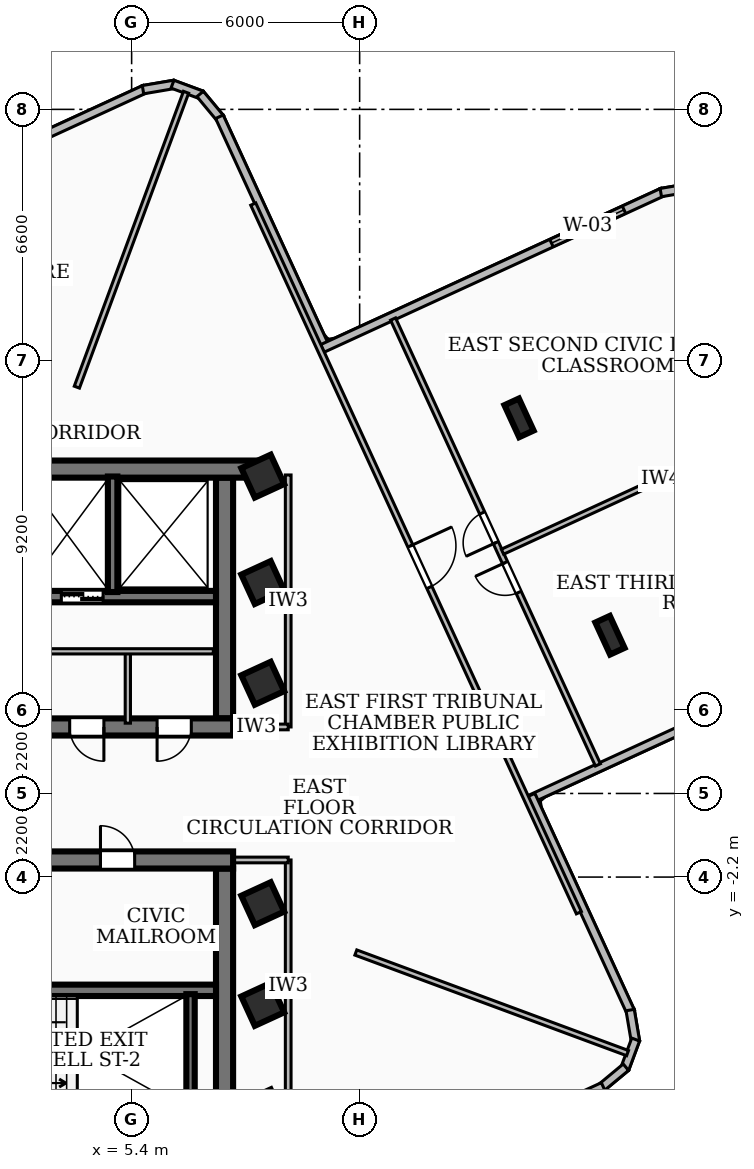
"""IFC4 building model, lengths in metres.
Left out: names, types, materials, properties, quantities, classifications, styles, units other than length and angle.
Written with IfcOpenShell. Run it as: python <this file> out.ifc"""

import sys

from ifc_helpers import new_model, si_unit, direction, frame, frame_2d, origin, origin_2d, place, context, subcontext, project, spatial, rectangle, i_section, extrude, element, fill, save


model = new_model("IFC4")
c1 = context("Model", 3, precision=1e-05, world=origin(), true_north=direction((0.0, 1.0)))
c2 = subcontext(c1, "Body", "Model", "MODEL_VIEW")
j1 = project(units=[si_unit("LENGTHUNIT", "METRE"), si_unit("PLANEANGLEUNIT", "RADIAN")], contexts=[c1])
p1 = place(None, origin())
s1 = spatial("IfcSite", under=j1, at=p1, CompositionType="ELEMENT")
p2 = place(p1, origin())
s2 = spatial("IfcBuilding", under=s1, at=p2, CompositionType="ELEMENT")
p3 = place(p2, frame((0.0, 0.0, 184.68)))
s3 = spatial("IfcBuildingStorey", under=s2, at=p3, CompositionType="ELEMENT", Elevation=184.68)
p4 = place(p3, frame((-8.78, 8.535, 0.0), z_axis=(0.0, 0.0, 1.0), x_axis=(1.0, 0.0, 0.0)))
e1 = element("IfcWall", 1, at=p4, inside=s3, PredefinedType="SHEAR", context=c2, shape_type="SweptSolid", body=[
    extrude(rectangle(XDim=17.56, YDim=0.45, at=frame_2d((8.78, 0.0))), origin(), (0.0, 0.0, 1.0), 3.34),
])
p5 = place(p3, frame((8.07, 1.75, 0.0), z_axis=(0.0, 0.0, 1.0), x_axis=(-1.0, 0.0, 0.0)))
e2 = element("IfcWall", 2, at=p5, inside=s3, PredefinedType="SHEAR", context=c2, shape_type="SweptSolid", body=[
    extrude(rectangle(XDim=16.14, YDim=0.45, at=frame_2d((8.07, 0.0))), origin(), (0.0, 0.0, 1.0), 3.34),
])
p6 = place(p5, frame((7.45, 0.0, 0.0)))
e3 = element("IfcOpeningElement", 3, at=p6, cuts=e2, PredefinedType="OPENING", context=c2, shape_type="SweptSolid", body=[
    extrude(rectangle(XDim=1.0, YDim=2.1, at=frame_2d((0.5, 1.05))), frame((0.0, 0.235, 0.0), z_axis=(0.0, -1.0, 0.0), x_axis=(1.0, 0.0, 0.0)), (0.0, 0.0, 1.0), 0.47),
])
p7 = place(p5, frame((3.4, 0.0, 0.0)))
e4 = element("IfcOpeningElement", 4, at=p7, cuts=e2, PredefinedType="OPENING", context=c2, shape_type="SweptSolid", body=[
    extrude(rectangle(XDim=0.9, YDim=2.06, at=frame_2d((0.45, 1.03))), frame((0.0, 0.235, 0.0), z_axis=(0.0, -1.0, 0.0), x_axis=(1.0, 0.0, 0.0)), (0.0, 0.0, 1.0), 0.47),
])
p8 = place(p5, frame((1.1, 0.0, 0.0)))
e5 = element("IfcOpeningElement", 5, at=p8, cuts=e2, PredefinedType="OPENING", context=c2, shape_type="SweptSolid", body=[
    extrude(rectangle(XDim=0.9, YDim=2.06, at=frame_2d((0.45, 1.03))), frame((0.0, 0.235, 0.0), z_axis=(0.0, -1.0, 0.0), x_axis=(1.0, 0.0, 0.0)), (0.0, 0.0, 1.0), 0.47),
])
p9 = place(p3, frame((7.845, 8.31, 0.0), z_axis=(0.0, 0.0, 1.0), x_axis=(0.0, -1.0, 0.0)))
e6 = element("IfcWall", 6, at=p9, inside=s3, PredefinedType="SHEAR", context=c2, shape_type="SweptSolid", body=[
    extrude(rectangle(XDim=6.335, YDim=0.45, at=frame_2d((3.167, 0.0))), origin(), (0.0, 0.0, 1.0), 3.34),
])
p10 = place(p3, frame((7.62, 5.18, 0.0), z_axis=(0.0, 0.0, 1.0), x_axis=(-1.0, 0.0, 0.0)))
e7 = element("IfcWall", 7, at=p10, inside=s3, PredefinedType="SOLIDWALL", context=c2, shape_type="SweptSolid", body=[
    extrude(rectangle(XDim=15.24, YDim=0.3, at=frame_2d((7.62, 0.0))), origin(), (0.0, 0.0, 1.0), 3.34),
])
p11 = place(p10, frame((5.77, 0.0, 0.0)))
e8 = element("IfcOpeningElement", 8, at=p11, cuts=e7, PredefinedType="OPENING", context=c2, shape_type="SweptSolid", body=[
    extrude(rectangle(XDim=1.1, YDim=2.15, at=frame_2d((0.55, 1.075))), frame((0.0, 0.16, 0.0), z_axis=(0.0, -1.0, 0.0), x_axis=(1.0, 0.0, 0.0)), (0.0, 0.0, 1.0), 0.32),
])
p12 = place(p10, frame((2.97, 0.0, 0.0)))
e9 = element("IfcOpeningElement", 9, at=p12, cuts=e7, PredefinedType="OPENING", context=c2, shape_type="SweptSolid", body=[
    extrude(rectangle(XDim=1.1, YDim=2.15, at=frame_2d((0.55, 1.075))), frame((0.0, 0.16, 0.0), z_axis=(0.0, -1.0, 0.0), x_axis=(1.0, 0.0, 0.0)), (0.0, 0.0, 1.0), 0.32),
])
p13 = place(p10, frame((7.97, 0.0, 0.0)))
e10 = element("IfcOpeningElement", 10, at=p13, cuts=e7, PredefinedType="OPENING", context=c2, shape_type="SweptSolid", body=[
    extrude(rectangle(XDim=1.0, YDim=2.1, at=frame_2d((0.5, 1.05))), frame((0.0, 0.16, 0.0), z_axis=(0.0, -1.0, 0.0), x_axis=(1.0, 0.0, 0.0)), (0.0, 0.0, 1.0), 0.32),
])
p14 = place(p3, frame((-8.07, -1.75, 0.0), z_axis=(0.0, 0.0, 1.0), x_axis=(1.0, 0.0, 0.0)))
e11 = element("IfcWall", 11, at=p14, inside=s3, PredefinedType="SHEAR", context=c2, shape_type="SweptSolid", body=[
    extrude(rectangle(XDim=16.14, YDim=0.45, at=frame_2d((8.07, 0.0))), origin(), (0.0, 0.0, 1.0), 3.34),
])
p15 = place(p14, frame((7.45, 0.0, 0.0)))
e12 = element("IfcOpeningElement", 12, at=p15, cuts=e11, PredefinedType="OPENING", context=c2, shape_type="SweptSolid", body=[
    extrude(rectangle(XDim=1.0, YDim=2.1, at=frame_2d((0.5, 1.05))), frame((0.0, 0.235, 0.0), z_axis=(0.0, -1.0, 0.0), x_axis=(1.0, 0.0, 0.0)), (0.0, 0.0, 1.0), 0.47),
])
p16 = place(p14, frame((12.65, 0.0, 0.0)))
e13 = element("IfcOpeningElement", 13, at=p16, cuts=e11, PredefinedType="OPENING", context=c2, shape_type="SweptSolid", body=[
    extrude(rectangle(XDim=0.9, YDim=2.06, at=frame_2d((0.45, 1.03))), frame((0.0, 0.235, 0.0), z_axis=(0.0, -1.0, 0.0), x_axis=(1.0, 0.0, 0.0)), (0.0, 0.0, 1.0), 0.47),
])
p17 = place(p14, frame((0.565, 0.0, 0.0)))
e14 = element("IfcOpeningElement", 14, at=p17, cuts=e11, PredefinedType="OPENING", context=c2, shape_type="SweptSolid", body=[
    extrude(rectangle(XDim=1.05, YDim=2.15, at=frame_2d((0.525, 1.075))), frame((0.0, 0.235, 0.0), z_axis=(0.0, -1.0, 0.0), x_axis=(1.0, 0.0, 0.0)), (0.0, 0.0, 1.0), 0.47),
])
p18 = place(p14, frame((2.125, 0.0, 0.0)))
e15 = element("IfcOpeningElement", 15, at=p18, cuts=e11, PredefinedType="OPENING", context=c2, shape_type="SweptSolid", body=[
    extrude(rectangle(XDim=1.05, YDim=2.15, at=frame_2d((0.525, 1.075))), frame((0.0, 0.235, 0.0), z_axis=(0.0, -1.0, 0.0), x_axis=(1.0, 0.0, 0.0)), (0.0, 0.0, 1.0), 0.47),
])
p19 = place(p14, frame((3.685, 0.0, 0.0)))
e16 = element("IfcOpeningElement", 16, at=p19, cuts=e11, PredefinedType="OPENING", context=c2, shape_type="SweptSolid", body=[
    extrude(rectangle(XDim=1.05, YDim=2.15, at=frame_2d((0.525, 1.075))), frame((0.0, 0.235, 0.0), z_axis=(0.0, -1.0, 0.0), x_axis=(1.0, 0.0, 0.0)), (0.0, 0.0, 1.0), 0.47),
])
p20 = place(p3, frame((7.845, -1.975, 0.0), z_axis=(0.0, 0.0, 1.0), x_axis=(0.0, -1.0, 0.0)))
e17 = element("IfcWall", 17, at=p20, inside=s3, PredefinedType="SHEAR", context=c2, shape_type="SweptSolid", body=[
    extrude(rectangle(XDim=6.335, YDim=0.45, at=frame_2d((3.167, 0.0))), origin(), (0.0, 0.0, 1.0), 3.34),
])
p21 = place(p3, frame((-7.62, -5.18, 0.0), z_axis=(0.0, 0.0, 1.0), x_axis=(1.0, 0.0, 0.0)))
e18 = element("IfcWall", 18, at=p21, inside=s3, PredefinedType="SOLIDWALL", context=c2, shape_type="SweptSolid", body=[
    extrude(rectangle(XDim=15.24, YDim=0.3, at=frame_2d((7.62, 0.0))), origin(), (0.0, 0.0, 1.0), 3.34),
])
p22 = place(p21, frame((5.77, 0.0, 0.0)))
e19 = element("IfcOpeningElement", 19, at=p22, cuts=e18, PredefinedType="OPENING", context=c2, shape_type="SweptSolid", body=[
    extrude(rectangle(XDim=1.1, YDim=2.15, at=frame_2d((0.55, 1.075))), frame((0.0, 0.16, 0.0), z_axis=(0.0, -1.0, 0.0), x_axis=(1.0, 0.0, 0.0)), (0.0, 0.0, 1.0), 0.32),
])
p23 = place(p21, frame((7.97, 0.0, 0.0)))
e20 = element("IfcOpeningElement", 20, at=p23, cuts=e18, PredefinedType="OPENING", context=c2, shape_type="SweptSolid", body=[
    extrude(rectangle(XDim=1.0, YDim=2.1, at=frame_2d((0.5, 1.05))), frame((0.0, 0.16, 0.0), z_axis=(0.0, -1.0, 0.0), x_axis=(1.0, 0.0, 0.0)), (0.0, 0.0, 1.0), 0.32),
])
p24 = place(p3, frame((6.95, -8.34, 0.0), z_axis=(0.0, 0.0, 1.0), x_axis=(0.0, 1.0, 0.0)))
e21 = element("IfcWall", 21, at=p24, inside=s3, PredefinedType="SOLIDWALL", context=c2, shape_type="SweptSolid", body=[
    extrude(rectangle(XDim=3.06, YDim=0.22, at=frame_2d((1.53, 0.0))), origin(), (0.0, 0.0, 1.0), 3.34),
])
p25 = place(p3, frame((4.9, 5.3, 0.0), z_axis=(0.0, 0.0, 1.0), x_axis=(0.0, 1.0, 0.0)))
e22 = element("IfcWall", 22, at=p25, inside=s3, PredefinedType="SOLIDWALL", context=c2, shape_type="SweptSolid", body=[
    extrude(rectangle(XDim=3.04, YDim=0.25, at=frame_2d((1.52, 0.0))), origin(), (0.0, 0.0, 1.0), 3.34),
])
for number, where, z_axis, x_axis in (
    (23, (8.85, -5.55, 0.0), (0.0, 0.0, 1.0), (0.909, 0.418, 0.0)),
    (24, (8.85, -2.9, 0.0), (0.0, 0.0, 1.0), (0.909, 0.418, 0.0)),
    (25, (8.85, 2.9, 0.0), (0.0, 0.0, 1.0), (0.909, 0.418, 0.0)),
    (26, (8.85, 5.55, 0.0), (0.0, 0.0, 1.0), (0.909, 0.418, 0.0)),
    (27, (8.85, 8.35, 0.0), (0.0, 0.0, 1.0), (0.909, 0.418, 0.0)),
):
    element("IfcColumn", number, at=place(p3, frame(where, z_axis=z_axis, x_axis=x_axis)), inside=s3, PredefinedType="COLUMN", context=c2, shape_type="SweptSolid", body=[
        extrude(rectangle(XDim=0.85, YDim=0.85, at=origin_2d()), origin(), (0.0, 0.0, 1.0), 3.6),
    ])
for number, where, z_axis, x_axis in (
    (28, (17.987, 4.164, 0.0), (0.0, 0.0, 1.0), (0.909, 0.418, 0.0)),
    (29, (15.594, 9.883, 0.0), (0.0, 0.0, 1.0), (0.909, 0.418, 0.0)),
):
    element("IfcColumn", number, at=place(p3, frame(where, z_axis=z_axis, x_axis=x_axis)), inside=s3, PredefinedType="COLUMN", context=c2, shape_type="SweptSolid", body=[
        extrude(i_section(OverallWidth=0.418, OverallDepth=0.927, WebThickness=0.019, FlangeThickness=0.032, at=origin_2d()), origin(), (0.0, 0.0, 1.0), 3.6),
    ])
p26 = place(p3, frame((0.042, 15.911, 0.0), z_axis=(0.0, 0.0, 1.0), x_axis=(0.908686412759, 0.417479344719, 0.0)))
e30 = element("IfcWall", 30, at=p26, inside=s3, PredefinedType="SOLIDWALL", context=c2, shape_type="SweptSolid", body=[
    extrude(rectangle(XDim=6.278, YDim=0.22, at=frame_2d((3.139, 0.0))), origin(), (0.0, 0.0, 1.0), 3.34),
])
p27 = place(p3, frame((5.699, 18.518, 0.0), z_axis=(0.0, 0.0, 1.0), x_axis=(0.985892022342, 0.167382556682, 0.0)))
e31 = element("IfcWall", 31, at=p27, inside=s3, PredefinedType="SOLIDWALL", context=c2, shape_type="SweptSolid", body=[
    extrude(rectangle(XDim=0.836, YDim=0.22, at=frame_2d((0.418, 0.0))), origin(), (0.0, 0.0, 1.0), 3.34),
])
p28 = place(p3, frame((6.475, 18.663, 0.0), z_axis=(0.0, 0.0, 1.0), x_axis=(0.937294412261, -0.348538641681, 0.0)))
e32 = element("IfcWall", 32, at=p28, inside=s3, PredefinedType="SOLIDWALL", context=c2, shape_type="SweptSolid", body=[
    extrude(rectangle(XDim=0.818, YDim=0.22, at=frame_2d((0.409, 0.0))), origin(), (0.0, 0.0, 1.0), 3.34),
])
p29 = place(p3, frame((7.203, 18.406, 0.0), z_axis=(0.0, 0.0, 1.0), x_axis=(0.638859924235, -0.769323077261, 0.0)))
e33 = element("IfcWall", 33, at=p29, inside=s3, PredefinedType="SOLIDWALL", context=c2, shape_type="SweptSolid", body=[
    extrude(rectangle(XDim=0.835, YDim=0.22, at=frame_2d((0.417, 0.0))), origin(), (0.0, 0.0, 1.0), 3.34),
])
p30 = place(p3, frame((7.71, 17.806, 0.0), z_axis=(0.0, 0.0, 1.0), x_axis=(0.417566275734, -0.908646468859, 0.0)))
e34 = element("IfcWall", 34, at=p30, inside=s3, PredefinedType="SOLIDWALL", context=c2, shape_type="SweptSolid", body=[
    extrude(rectangle(XDim=6.758, YDim=0.22, at=frame_2d((3.379, 0.0))), origin(), (0.0, 0.0, 1.0), 3.34),
])
p31 = place(p3, frame((10.415, 11.708, 0.0), z_axis=(0.0, 0.0, 1.0), x_axis=(0.908672019386, 0.41751067194, 0.0)))
e35 = element("IfcWall", 35, at=p31, inside=s3, PredefinedType="SOLIDWALL", context=c2, shape_type="SweptSolid", body=[
    extrude(rectangle(XDim=9.858, YDim=0.22, at=frame_2d((4.929, 0.0))), origin(), (0.0, 0.0, 1.0), 3.34),
])
p32 = place(p31, frame((6.64, 0.0, 0.85)))
e36 = element("IfcOpeningElement", 36, at=p32, cuts=e35, PredefinedType="OPENING", context=c2, shape_type="SweptSolid", body=[
    extrude(rectangle(XDim=2.1, YDim=2.0, at=frame_2d((1.05, 1.0))), frame((0.0, 0.12, 0.0), z_axis=(0.0, -1.0, 0.0), x_axis=(1.0, 0.0, 0.0)), (0.0, 0.0, 1.0), 0.24),
])
p33 = place(p3, frame((19.325, 15.81, 0.0), z_axis=(0.0, 0.0, 1.0), x_axis=(0.985859228908, 0.167575597201, 0.0)))
e37 = element("IfcWall", 37, at=p33, inside=s3, PredefinedType="SOLIDWALL", context=c2, shape_type="SweptSolid", body=[
    extrude(rectangle(XDim=0.835, YDim=0.22, at=frame_2d((0.417, 0.0))), origin(), (0.0, 0.0, 1.0), 3.34),
])
p34 = place(p3, frame((24.826, 3.957, 0.0), z_axis=(0.0, 0.0, 1.0), x_axis=(-0.908672019386, -0.41751067194, 0.0)))
e38 = element("IfcWall", 38, at=p34, inside=s3, PredefinedType="SOLIDWALL", context=c2, shape_type="SweptSolid", body=[
    extrude(rectangle(XDim=9.858, YDim=0.22, at=frame_2d((4.929, 0.0))), origin(), (0.0, 0.0, 1.0), 3.34),
])
p35 = place(p34, frame((0.85, 0.0, 0.85)))
e39 = element("IfcOpeningElement", 39, at=p35, cuts=e38, PredefinedType="OPENING", context=c2, shape_type="SweptSolid", body=[
    extrude(rectangle(XDim=2.1, YDim=1.6, at=frame_2d((1.05, 0.8))), frame((0.0, 0.12, 0.0), z_axis=(0.0, -1.0, 0.0), x_axis=(1.0, 0.0, 0.0)), (0.0, 0.0, 1.0), 0.24),
])
p36 = place(p3, frame((15.911, -0.042, 0.0), z_axis=(0.0, 0.0, 1.0), x_axis=(0.417479344719, -0.908686412759, 0.0)))
e40 = element("IfcWall", 40, at=p36, inside=s3, PredefinedType="SOLIDWALL", context=c2, shape_type="SweptSolid", body=[
    extrude(rectangle(XDim=6.278, YDim=0.22, at=frame_2d((3.139, 0.0))), origin(), (0.0, 0.0, 1.0), 3.34),
])
p37 = place(p3, frame((18.518, -5.699, 0.0), z_axis=(0.0, 0.0, 1.0), x_axis=(0.167382556682, -0.985892022342, 0.0)))
e41 = element("IfcWall", 41, at=p37, inside=s3, PredefinedType="SOLIDWALL", context=c2, shape_type="SweptSolid", body=[
    extrude(rectangle(XDim=0.836, YDim=0.22, at=frame_2d((0.418, 0.0))), origin(), (0.0, 0.0, 1.0), 3.34),
])
p38 = place(p3, frame((18.663, -6.475, 0.0), z_axis=(0.0, 0.0, 1.0), x_axis=(-0.348538641681, -0.937294412261, 0.0)))
e42 = element("IfcWall", 42, at=p38, inside=s3, PredefinedType="SOLIDWALL", context=c2, shape_type="SweptSolid", body=[
    extrude(rectangle(XDim=0.818, YDim=0.22, at=frame_2d((0.409, 0.0))), origin(), (0.0, 0.0, 1.0), 3.34),
])
p39 = place(p3, frame((18.406, -7.203, 0.0), z_axis=(0.0, 0.0, 1.0), x_axis=(-0.769323077261, -0.638859924235, 0.0)))
e43 = element("IfcWall", 43, at=p39, inside=s3, PredefinedType="SOLIDWALL", context=c2, shape_type="SweptSolid", body=[
    extrude(rectangle(XDim=0.835, YDim=0.22, at=frame_2d((0.417, 0.0))), origin(), (0.0, 0.0, 1.0), 3.34),
])
p40 = place(p3, frame((17.806, -7.71, 0.0), z_axis=(0.0, 0.0, 1.0), x_axis=(-0.908646468859, -0.417566275734, 0.0)))
e44 = element("IfcWall", 44, at=p40, inside=s3, PredefinedType="SOLIDWALL", context=c2, shape_type="SweptSolid", body=[
    extrude(rectangle(XDim=6.758, YDim=0.22, at=frame_2d((3.379, 0.0))), origin(), (0.0, 0.0, 1.0), 3.34),
])
p41 = place(p3, frame((2.9, 3.74, 0.0), z_axis=(0.0, 0.0, 1.0), x_axis=(1.0, 0.0, 0.0)))
e45 = element("IfcWall", 45, at=p41, inside=s3, PredefinedType="PARTITIONING", context=c2, shape_type="SweptSolid", body=[
    extrude(rectangle(XDim=4.65, YDim=0.138, at=frame_2d((2.325, 0.0))), origin(), (0.0, 0.0, 1.0), 3.34),
])
p42 = place(p3, frame((5.3, 1.85, 0.0), z_axis=(0.0, 0.0, 1.0), x_axis=(0.0, 1.0, 0.0)))
e46 = element("IfcWall", 46, at=p42, inside=s3, PredefinedType="PARTITIONING", context=c2, shape_type="SweptSolid", body=[
    extrude(rectangle(XDim=1.89, YDim=0.138, at=frame_2d((0.945, 0.0))), origin(), (0.0, 0.0, 1.0), 2.57),
])
p43 = place(p3, frame((9.52, 1.75, 0.0), z_axis=(0.0, 0.0, 1.0), x_axis=(0.0, 1.0, 0.0)))
e47 = element("IfcWall", 47, at=p43, inside=s3, PredefinedType="PARTITIONING", context=c2, shape_type="SweptSolid", body=[
    extrude(rectangle(XDim=6.63, YDim=0.15, at=frame_2d((3.315, 0.0))), origin(), (0.0, 0.0, 1.0), 2.644),
])
p44 = place(p3, frame((7.85, 1.75, 0.0), z_axis=(0.0, 0.0, 1.0), x_axis=(1.0, 0.0, 0.0)))
e48 = element("IfcWall", 48, at=p44, inside=s3, PredefinedType="PARTITIONING", context=c2, shape_type="SweptSolid", body=[
    extrude(rectangle(XDim=1.67, YDim=0.15, at=frame_2d((0.835, 0.0))), origin(), (0.0, 0.0, 1.0), 2.57),
])
p45 = place(p3, frame((9.52, -8.38, 0.0), z_axis=(0.0, 0.0, 1.0), x_axis=(0.0, 1.0, 0.0)))
e49 = element("IfcWall", 49, at=p45, inside=s3, PredefinedType="PARTITIONING", context=c2, shape_type="SweptSolid", body=[
    extrude(rectangle(XDim=6.63, YDim=0.15, at=frame_2d((3.315, 0.0))), origin(), (0.0, 0.0, 1.0), 3.34),
])
p46 = place(p3, frame((7.85, -1.75, 0.0), z_axis=(0.0, 0.0, 1.0), x_axis=(1.0, 0.0, 0.0)))
e50 = element("IfcWall", 50, at=p46, inside=s3, PredefinedType="PARTITIONING", context=c2, shape_type="SweptSolid", body=[
    extrude(rectangle(XDim=1.67, YDim=0.15, at=frame_2d((0.835, 0.0))), origin(), (0.0, 0.0, 1.0), 2.57),
])
p47 = place(p3, frame((3.959, 10.691, 0.0), z_axis=(0.0, 0.0, 1.0), x_axis=(0.347243238044, 0.937775097576, 0.0)))
e51 = element("IfcWall", 51, at=p47, inside=s3, PredefinedType="PARTITIONING", context=c2, shape_type="SweptSolid", body=[
    extrude(rectangle(XDim=8.274, YDim=0.145, at=frame_2d((4.137, 0.0))), origin(), (0.0, 0.0, 1.0), 3.34),
])
p48 = place(p3, frame((11.3, -4.185, 0.0), z_axis=(0.0, 0.0, 1.0), x_axis=(0.937797421925, -0.347182942311, 0.0)))
e52 = element("IfcWall", 52, at=p48, inside=s3, PredefinedType="PARTITIONING", context=c2, shape_type="SweptSolid", body=[
    extrude(rectangle(XDim=7.624, YDim=0.145, at=frame_2d((3.812, 0.0))), origin(), (0.0, 0.0, 1.0), 3.34),
])
p49 = place(p3, frame((8.6, 15.508, 0.0), z_axis=(0.0, 0.0, 1.0), x_axis=(0.41757132443, -0.908644148726, 0.0)))
e53 = element("IfcWall", 53, at=p49, inside=s3, PredefinedType="PARTITIONING", context=c2, shape_type="SweptSolid", body=[
    extrude(rectangle(XDim=20.521, YDim=0.145, at=frame_2d((10.26, 0.0))), origin(), (0.0, 0.0, 1.0), 2.644),
])
p50 = place(p49, frame((9.9, 0.0, 0.0)))
e54 = element("IfcOpeningElement", 54, at=p50, cuts=e53, PredefinedType="OPENING", context=c2, shape_type="SweptSolid", body=[
    extrude(rectangle(XDim=1.2, YDim=2.1, at=frame_2d((0.6, 1.05))), frame((0.0, 0.083, 0.0), z_axis=(0.0, -1.0, 0.0), x_axis=(1.0, 0.0, 0.0)), (0.0, 0.0, 1.0), 0.165),
])
p51 = place(p3, frame((15.159, 6.361, 0.0), z_axis=(0.0, 0.0, 1.0), x_axis=(0.908662943876, 0.417530423355, 0.0)))
e55 = element("IfcWall", 55, at=p51, inside=s3, PredefinedType="PARTITIONING", context=c2, shape_type="SweptSolid", body=[
    extrude(rectangle(XDim=9.185, YDim=0.145, at=frame_2d((4.592, 0.0))), origin(), (0.0, 0.0, 1.0), 3.34),
])
p52 = place(p3, frame((17.67, 0.752, 0.0), z_axis=(0.0, 0.0, 1.0), x_axis=(-0.41749974953, 0.908677037864, 0.0)))
e56 = element("IfcWall", 56, at=p52, inside=s3, PredefinedType="PARTITIONING", context=c2, shape_type="SweptSolid", body=[
    extrude(rectangle(XDim=12.91, YDim=0.145, at=frame_2d((6.455, 0.0))), origin(), (0.0, 0.0, 1.0), 2.644),
])
p53 = place(p52, frame((4.995, 0.0, 0.0)))
e57 = element("IfcOpeningElement", 57, at=p53, cuts=e56, PredefinedType="OPENING", context=c2, shape_type="SweptSolid", body=[
    extrude(rectangle(XDim=0.86, YDim=2.04, at=frame_2d((0.43, 1.02))), frame((0.0, 0.083, 0.0), z_axis=(0.0, -1.0, 0.0), x_axis=(1.0, 0.0, 0.0)), (0.0, 0.0, 1.0), 0.165),
])
p54 = place(p52, frame((6.435, 0.0, 0.0)))
e58 = element("IfcOpeningElement", 58, at=p54, cuts=e56, PredefinedType="OPENING", context=c2, shape_type="SweptSolid", body=[
    extrude(rectangle(XDim=0.86, YDim=2.04, at=frame_2d((0.43, 1.02))), frame((0.0, 0.083, 0.0), z_axis=(0.0, -1.0, 0.0), x_axis=(1.0, 0.0, 0.0)), (0.0, 0.0, 1.0), 0.165),
])
p55 = place(p32, origin())
e59 = element("IfcWindow", 59, at=p55, inside=s3, PartitioningType="SINGLE_PANEL", PredefinedType="WINDOW", context=c2, shape_type="SweptSolid", body=[
    extrude(rectangle(XDim=2.1, YDim=2.0, at=frame_2d((1.05, 1.0))), frame((0.0, 0.03, 0.0), z_axis=(0.0, -1.0, 0.0), x_axis=(1.0, 0.0, 0.0)), (0.0, 0.0, 1.0), 0.06),
])
fill(e36, e59)
p56 = place(p12, origin())
e60 = element("IfcDoor", 60, at=p56, inside=s3, OperationType="DOUBLE_DOOR_SLIDING", PredefinedType="DOOR", context=c2, shape_type="SweptSolid", body=[
    extrude(rectangle(XDim=1.1, YDim=2.15, at=frame_2d((0.55, 1.075))), frame((0.0, 0.025, 0.0), z_axis=(0.0, -1.0, 0.0), x_axis=(1.0, 0.0, 0.0)), (0.0, 0.0, 1.0), 0.05),
])
fill(e9, e60)
p57 = place(p16, origin())
e61 = element("IfcDoor", 61, at=p57, inside=s3, OperationType="SINGLE_SWING_LEFT", PredefinedType="DOOR", context=c2, shape_type="SweptSolid", body=[
    extrude(rectangle(XDim=0.9, YDim=2.06, at=frame_2d((0.45, 1.03))), frame((0.0, 0.025, 0.0), z_axis=(0.0, -1.0, 0.0), x_axis=(1.0, 0.0, 0.0)), (0.0, 0.0, 1.0), 0.05),
])
fill(e13, e61)
p58 = place(p7, origin())
e62 = element("IfcDoor", 62, at=p58, inside=s3, OperationType="SINGLE_SWING_LEFT", PredefinedType="DOOR", context=c2, shape_type="SweptSolid", body=[
    extrude(rectangle(XDim=0.9, YDim=2.06, at=frame_2d((0.45, 1.03))), frame((0.0, 0.025, 0.0), z_axis=(0.0, -1.0, 0.0), x_axis=(1.0, 0.0, 0.0)), (0.0, 0.0, 1.0), 0.05),
])
fill(e4, e62)
p59 = place(p8, origin())
e63 = element("IfcDoor", 63, at=p59, inside=s3, OperationType="SINGLE_SWING_RIGHT", PredefinedType="DOOR", context=c2, shape_type="SweptSolid", body=[
    extrude(rectangle(XDim=0.9, YDim=2.06, at=frame_2d((0.45, 1.03))), frame((0.0, 0.025, 0.0), z_axis=(0.0, -1.0, 0.0), x_axis=(1.0, 0.0, 0.0)), (0.0, 0.0, 1.0), 0.05),
])
fill(e5, e63)
p60 = place(p50, origin())
e64 = element("IfcDoor", 64, at=p60, inside=s3, OperationType="SINGLE_SWING_LEFT", PredefinedType="DOOR", context=c2, shape_type="SweptSolid", body=[
    extrude(rectangle(XDim=1.2, YDim=2.1, at=frame_2d((0.6, 1.05))), frame((0.0, 0.025, 0.0), z_axis=(0.0, -1.0, 0.0), x_axis=(1.0, 0.0, 0.0)), (0.0, 0.0, 1.0), 0.05),
])
fill(e54, e64)
p61 = place(p53, origin())
e65 = element("IfcDoor", 65, at=p61, inside=s3, OperationType="SINGLE_SWING_RIGHT", PredefinedType="DOOR", context=c2, shape_type="SweptSolid", body=[
    extrude(rectangle(XDim=0.86, YDim=2.04, at=frame_2d((0.43, 1.02))), frame((0.0, 0.025, 0.0), z_axis=(0.0, -1.0, 0.0), x_axis=(1.0, 0.0, 0.0)), (0.0, 0.0, 1.0), 0.05),
])
fill(e57, e65)
p62 = place(p54, origin())
e66 = element("IfcDoor", 66, at=p62, inside=s3, OperationType="SINGLE_SWING_LEFT", PredefinedType="DOOR", context=c2, shape_type="SweptSolid", body=[
    extrude(rectangle(XDim=0.86, YDim=2.04, at=frame_2d((0.43, 1.02))), frame((0.0, 0.025, 0.0), z_axis=(0.0, -1.0, 0.0), x_axis=(1.0, 0.0, 0.0)), (0.0, 0.0, 1.0), 0.05),
])
fill(e58, e66)
save(model, sys.argv[1])
